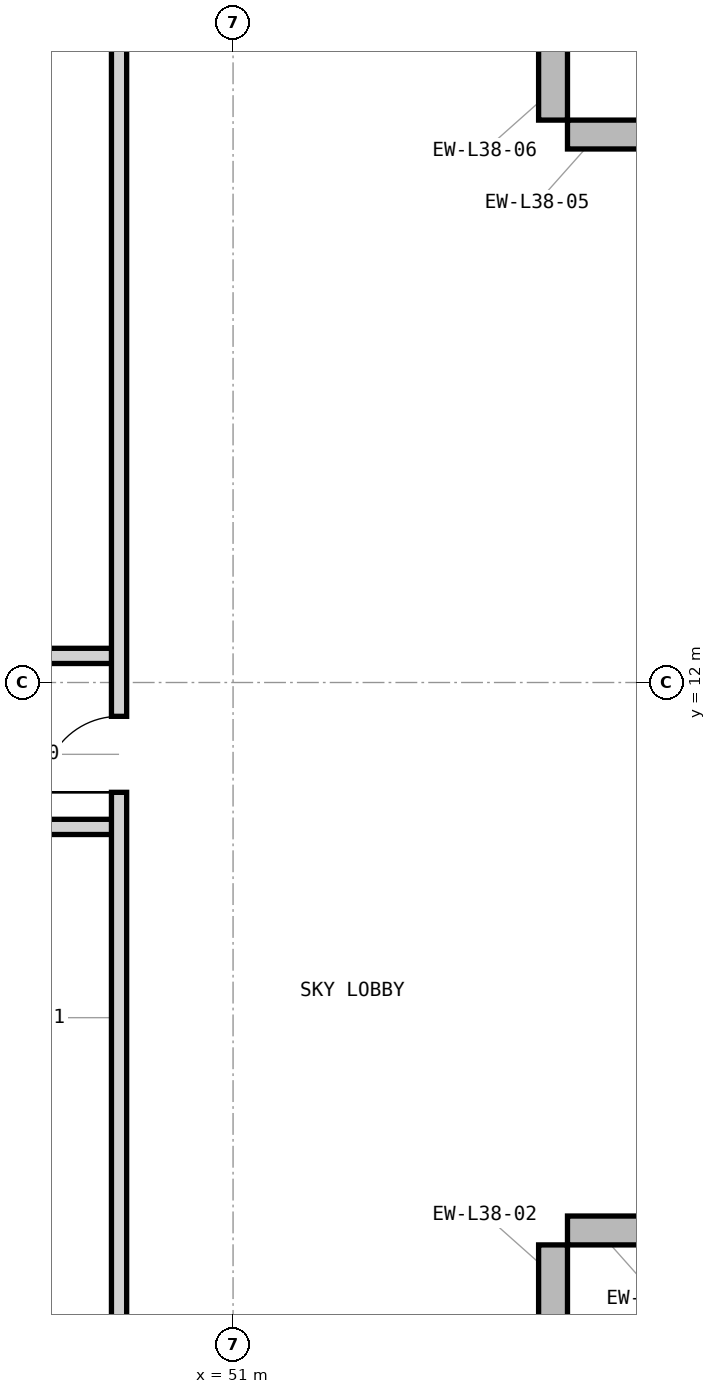
"""IFC4 building model, lengths in metres.
Left out: names, types, materials, properties, quantities, classifications, styles, units other than length and angle.
Written with IfcOpenShell. Run it as: python <this file> out.ifc"""

import sys

from ifc_helpers import new_model, si_unit, direction, frame, frame_2d, origin, place, context, subcontext, project, spatial, rectangle, extrude, element, fill, save


model = new_model("IFC4")
c1 = context("Model", 3, precision=1e-05, world=origin(), true_north=direction((0.0, 1.0)))
c2 = subcontext(c1, "Body", "Model", "MODEL_VIEW")
j1 = project(units=[si_unit("LENGTHUNIT", "METRE"), si_unit("PLANEANGLEUNIT", "RADIAN")], contexts=[c1])
p1 = place(None, origin())
s1 = spatial("IfcSite", under=j1, at=p1, CompositionType="ELEMENT")
p2 = place(p1, origin())
s2 = spatial("IfcBuilding", under=s1, at=p2, CompositionType="ELEMENT")
p3 = place(p2, frame((0.0, 0.0, 160.2)))
s3 = spatial("IfcBuildingStorey", under=s2, at=p3, CompositionType="ELEMENT", Elevation=160.2)
for number, where, z_axis, x_axis in (
    (1, (55.21, 3.0, 0.0), (0.0, 0.0, 1.0), (0.0, 1.0, 0.0)),
    (2, (55.4, 4.79, 0.0), (0.0, 0.0, 1.0), (1.0, 0.0, 0.0)),
    (3, (57.0, 19.21, 0.0), (0.0, 0.0, 1.0), (-1.0, 0.0, 0.0)),
    (4, (55.21, 19.4, 0.0), (0.0, 0.0, 1.0), (0.0, 1.0, 0.0)),
):
    element("IfcWall", number, at=place(p3, frame(where, z_axis=z_axis, x_axis=x_axis)), inside=s3, PredefinedType="STANDARD", context=c2, shape_type="SweptSolid", body=[
        extrude(rectangle(XDim=1.6, YDim=0.38, at=frame_2d((0.8, 0.0))), origin(), (0.0, 0.0, 1.0), 4.0),
    ])
p4 = place(p3, frame((38.1, 10.1, 0.0), z_axis=(0.0, 0.0, 1.0), x_axis=(1.0, 0.0, 0.0)))
e5 = element("IfcWall", 5, at=p4, inside=s3, PredefinedType="PARTITIONING", context=c2, shape_type="SweptSolid", body=[
    extrude(rectangle(XDim=11.4, YDim=0.2, at=frame_2d((5.7, 0.0))), origin(), (0.0, 0.0, 1.0), 3.93),
])
p5 = place(p4, frame((4.95, 0.0, 0.0)))
e6 = element("IfcOpeningElement", 6, at=p5, cuts=e5, PredefinedType="OPENING", context=c2, shape_type="SweptSolid", body=[
    extrude(rectangle(XDim=1.5, YDim=2.3, at=frame_2d((0.75, 1.15))), frame((0.0, 0.11, 0.0), z_axis=(0.0, -1.0, 0.0), x_axis=(1.0, 0.0, 0.0)), (0.0, 0.0, 1.0), 0.22),
])
p6 = place(p3, frame((38.1, 12.35, 0.0), z_axis=(0.0, 0.0, 1.0), x_axis=(1.0, 0.0, 0.0)))
e7 = element("IfcWall", 7, at=p6, inside=s3, PredefinedType="PARTITIONING", context=c2, shape_type="SweptSolid", body=[
    extrude(rectangle(XDim=11.4, YDim=0.2, at=frame_2d((5.7, 0.0))), origin(), (0.0, 0.0, 1.0), 3.93),
])
p7 = place(p6, frame((4.95, 0.0, 0.0)))
e8 = element("IfcOpeningElement", 8, at=p7, cuts=e7, PredefinedType="OPENING", context=c2, shape_type="SweptSolid", body=[
    extrude(rectangle(XDim=1.5, YDim=2.3, at=frame_2d((0.75, 1.15))), frame((0.0, 0.11, 0.0), z_axis=(0.0, -1.0, 0.0), x_axis=(1.0, 0.0, 0.0)), (0.0, 0.0, 1.0), 0.22),
])
p8 = place(p3, frame((49.5, 3.18, 0.0), z_axis=(0.0, 0.0, 1.0), x_axis=(0.0, 1.0, 0.0)))
e9 = element("IfcWall", 9, at=p8, inside=s3, PredefinedType="PARTITIONING", context=c2, shape_type="SweptSolid", body=[
    extrude(rectangle(XDim=17.64, YDim=0.2, at=frame_2d((8.82, 0.0))), origin(), (0.0, 0.0, 1.0), 3.93),
])
p9 = place(p8, frame((7.375, 0.0, 0.0)))
e10 = element("IfcOpeningElement", 10, at=p9, cuts=e9, PredefinedType="OPENING", context=c2, shape_type="SweptSolid", body=[
    extrude(rectangle(XDim=1.0, YDim=2.15, at=frame_2d((0.5, 1.075))), frame((0.0, 0.11, 0.0), z_axis=(0.0, -1.0, 0.0), x_axis=(1.0, 0.0, 0.0)), (0.0, 0.0, 1.0), 0.22),
])
p10 = place(p9, origin())
e11 = element("IfcDoor", 11, at=p10, inside=s3, OperationType="SINGLE_SWING_LEFT", PredefinedType="DOOR", context=c2, shape_type="SweptSolid", body=[
    extrude(rectangle(XDim=1.0, YDim=2.15, at=frame_2d((0.5, 1.075))), frame((0.0, 0.025, 0.0), z_axis=(0.0, -1.0, 0.0), x_axis=(1.0, 0.0, 0.0)), (0.0, 0.0, 1.0), 0.05),
])
fill(e10, e11)
save(model, sys.argv[1])
